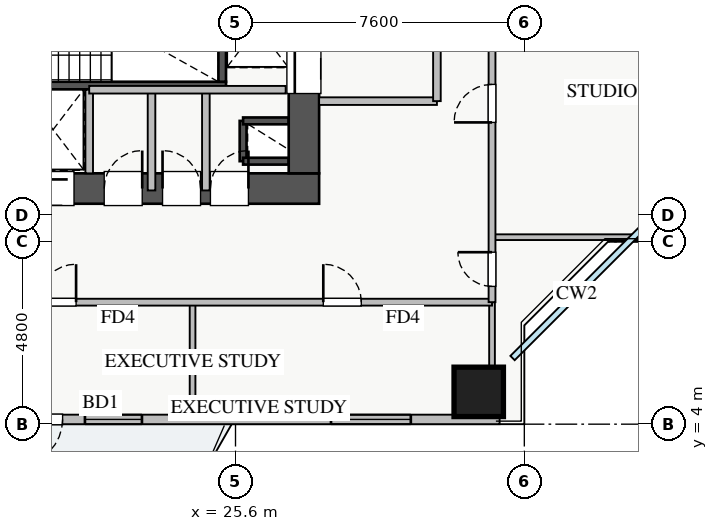
"""IFC4 building model, lengths in metres.
Left out: names, types, materials, properties, quantities, classifications, styles, units other than length and angle.
Written with IfcOpenShell. Run it as: python <this file> out.ifc"""

import sys

from ifc_helpers import new_model, si_unit, direction, frame, frame_2d, origin, origin_2d, place, context, subcontext, project, spatial, rectangle, extrude, source, transform, mapped, element, fill, save


model = new_model("IFC4")
c1 = context("Model", 3, precision=1e-05, world=origin(), true_north=direction((0.0, 1.0)))
c2 = subcontext(c1, "Body", "Model", "MODEL_VIEW")
j1 = project(units=[si_unit("LENGTHUNIT", "METRE"), si_unit("PLANEANGLEUNIT", "RADIAN")], contexts=[c1])
p1 = place(None, origin())
s1 = spatial("IfcSite", under=j1, at=p1, CompositionType="ELEMENT")
p2 = place(p1, origin())
s2 = spatial("IfcBuilding", under=s1, at=p2, CompositionType="ELEMENT")
p3 = place(p2, frame((0.0, 0.0, 86.0)))
s3 = spatial("IfcBuildingStorey", under=s2, at=p3, CompositionType="ELEMENT", Elevation=86.0)
p4 = place(p3, frame((25.8, 10.92, 0.0), z_axis=(0.0, 0.0, 1.0), x_axis=(0.0, 1.0, 0.0)))
e1 = element("IfcWall", 1, at=p4, inside=s3, PredefinedType="SHEAR", context=c2, shape_type="SweptSolid", body=[
    extrude(rectangle(XDim=1.06, YDim=0.18, at=frame_2d((0.53, 0.0))), origin(), (0.0, 0.0, 1.0), 3.07),
])
for number, where, z_axis, x_axis in (
    (2, (25.8, 11.98, 0.0), (0.0, 0.0, 1.0), (1.0, 0.0, 0.0)),
    (3, (25.8, 10.92, 0.0), (0.0, 0.0, 1.0), (1.0, 0.0, 0.0)),
):
    element("IfcWall", number, at=place(p3, frame(where, z_axis=z_axis, x_axis=x_axis)), inside=s3, PredefinedType="SHEAR", context=c2, shape_type="SweptSolid", body=[
        extrude(rectangle(XDim=1.2, YDim=0.18, at=frame_2d((0.6, 0.0))), origin(), (0.0, 0.0, 1.0), 3.07),
    ])
p5 = place(p3, frame((19.88, 12.8, 0.0), z_axis=(0.0, 0.0, 1.0), x_axis=(1.0, 0.0, 0.0)))
e4 = element("IfcWall", 4, at=p5, inside=s3, PredefinedType="SHEAR", context=c2, shape_type="SweptSolid", body=[
    extrude(rectangle(XDim=1.87, YDim=0.18, at=frame_2d((0.935, 0.0))), origin(), (0.0, 0.0, 1.0), 3.07),
])
p6 = place(p3, frame((18.2, 12.91, 0.0), z_axis=(0.0, 0.0, 1.0), x_axis=(1.0, 0.0, 0.0)))
e5 = element("IfcWall", 5, at=p6, inside=s3, PredefinedType="SHEAR", context=c2, shape_type="SweptSolid", body=[
    extrude(rectangle(XDim=7.15, YDim=0.2, at=frame_2d((3.575, 0.0))), origin(), (0.0, 0.0, 1.0), 3.25),
])
p7 = place(p6, frame((0.35, 0.0, 0.0)))
e6 = element("IfcOpeningElement", 6, at=p7, cuts=e5, PredefinedType="OPENING", context=c2, shape_type="SweptSolid", body=[
    extrude(rectangle(XDim=1.1, YDim=2.05, at=frame_2d((0.55, 1.025))), frame((0.0, 0.11, 0.0), z_axis=(0.0, -1.0, 0.0), x_axis=(1.0, 0.0, 0.0)), (0.0, 0.0, 1.0), 0.22),
])
p8 = place(p3, frame((25.25, 13.01, 0.0), z_axis=(0.0, 0.0, 1.0), x_axis=(0.0, 1.0, 0.0)))
e7 = element("IfcWall", 7, at=p8, inside=s3, PredefinedType="SHEAR", context=c2, shape_type="SweptSolid", body=[
    extrude(rectangle(XDim=2.94, YDim=0.2, at=frame_2d((1.47, 0.0))), origin(), (0.0, 0.0, 1.0), 3.25),
])
p9 = place(p3, frame((10.2, 10.2, 0.0), z_axis=(0.0, 0.0, 1.0), x_axis=(1.0, 0.0, 0.0)))
e8 = element("IfcWall", 8, at=p9, inside=s3, PredefinedType="SHEAR", context=c2, shape_type="SweptSolid", body=[
    extrude(rectangle(XDim=17.6, YDim=0.8, at=frame_2d((8.8, 0.0))), origin(), (0.0, 0.0, 1.0), 3.25),
])
p10 = place(p9, frame((1.15, 0.0, 0.0)))
e9 = element("IfcOpeningElement", 9, at=p10, cuts=e8, PredefinedType="OPENING", context=c2, shape_type="SweptSolid", body=[
    extrude(rectangle(XDim=1.1, YDim=2.05, at=frame_2d((0.55, 1.025))), frame((0.0, 0.41, 0.0), z_axis=(0.0, -1.0, 0.0), x_axis=(1.0, 0.0, 0.0)), (0.0, 0.0, 1.0), 0.82),
])
p11 = place(p9, frame((8.3, 0.0, 0.0)))
e10 = element("IfcOpeningElement", 10, at=p11, cuts=e8, PredefinedType="OPENING", context=c2, shape_type="SweptSolid", body=[
    extrude(rectangle(XDim=1.1, YDim=2.05, at=frame_2d((0.55, 1.025))), frame((0.0, 0.41, 0.0), z_axis=(0.0, -1.0, 0.0), x_axis=(1.0, 0.0, 0.0)), (0.0, 0.0, 1.0), 0.82),
])
p12 = place(p9, frame((10.05, 0.0, 0.0)))
e11 = element("IfcOpeningElement", 11, at=p12, cuts=e8, PredefinedType="OPENING", context=c2, shape_type="SweptSolid", body=[
    extrude(rectangle(XDim=1.1, YDim=2.05, at=frame_2d((0.55, 1.025))), frame((0.0, 0.41, 0.0), z_axis=(0.0, -1.0, 0.0), x_axis=(1.0, 0.0, 0.0)), (0.0, 0.0, 1.0), 0.82),
])
p13 = place(p9, frame((14.74, 0.0, 0.0)))
e12 = element("IfcOpeningElement", 12, at=p13, cuts=e8, PredefinedType="OPENING", context=c2, shape_type="SweptSolid", body=[
    extrude(rectangle(XDim=1.0, YDim=2.05, at=frame_2d((0.5, 1.025))), frame((0.0, 0.41, 0.0), z_axis=(0.0, -1.0, 0.0), x_axis=(1.0, 0.0, 0.0)), (0.0, 0.0, 1.0), 0.82),
])
p14 = place(p9, frame((11.945, 0.0, 0.0)))
e13 = element("IfcOpeningElement", 13, at=p14, cuts=e8, PredefinedType="OPENING", context=c2, shape_type="SweptSolid", body=[
    extrude(rectangle(XDim=1.0, YDim=2.05, at=frame_2d((0.5, 1.025))), frame((0.0, 0.41, 0.0), z_axis=(0.0, -1.0, 0.0), x_axis=(1.0, 0.0, 0.0)), (0.0, 0.0, 1.0), 0.82),
])
p15 = place(p9, frame((13.48, 0.0, 0.0)))
e14 = element("IfcOpeningElement", 14, at=p15, cuts=e8, PredefinedType="OPENING", context=c2, shape_type="SweptSolid", body=[
    extrude(rectangle(XDim=1.0, YDim=2.05, at=frame_2d((0.5, 1.025))), frame((0.0, 0.41, 0.0), z_axis=(0.0, -1.0, 0.0), x_axis=(1.0, 0.0, 0.0)), (0.0, 0.0, 1.0), 0.82),
])
p16 = place(p3, frame((27.4, 10.6, 0.0), z_axis=(0.0, 0.0, 1.0), x_axis=(0.0, 1.0, 0.0)))
e15 = element("IfcWall", 15, at=p16, inside=s3, PredefinedType="SHEAR", context=c2, shape_type="SweptSolid", body=[
    extrude(rectangle(XDim=5.6, YDim=0.8, at=frame_2d((2.8, 0.0))), origin(), (0.0, 0.0, 1.0), 3.25),
])
p17 = place(p16, frame((2.1, 0.0, 0.0)))
e16 = element("IfcOpeningElement", 16, at=p17, cuts=e15, PredefinedType="OPENING", context=c2, shape_type="SweptSolid", body=[
    extrude(rectangle(XDim=1.3, YDim=2.05, at=frame_2d((0.65, 1.025))), frame((0.0, 0.41, 0.0), z_axis=(0.0, -1.0, 0.0), x_axis=(1.0, 0.0, 0.0)), (0.0, 0.0, 1.0), 0.82),
])
m1 = source(origin(), c2, "Body", "SweptSolid", [
    extrude(rectangle(XDim=1.3, YDim=1.3, at=origin_2d()), origin(), (0.0, 0.0, 1.0), 3.25),
])
p18 = place(p3, frame((32.0, 4.85, 0.0), z_axis=(0.0, 0.0, 1.0), x_axis=(1.0, 0.0, 0.0)))
e17 = element("IfcColumn", 17, at=p18, inside=s3, PredefinedType="COLUMN", context=c2, shape_type="MappedRepresentation", body=[
    mapped(m1, transform((0.0, 0.0, 0.0), x_axis=(1.0, 0.0, 0.0), y_axis=(0.0, 1.0, 0.0), z_axis=(0.0, 0.0, 1.0), scale=1.0)),
])
p19 = place(p3, frame((5.45, 4.125, 0.0), z_axis=(0.0, 0.0, 1.0), x_axis=(1.0, 0.0, 0.0)))
e18 = element("IfcWall", 18, at=p19, inside=s3, PredefinedType="STANDARD", context=c2, shape_type="SweptSolid", body=[
    extrude(rectangle(XDim=27.1, YDim=0.25, at=frame_2d((13.55, 0.0))), origin(), (0.0, 0.0, 1.0), 2.61),
])
p20 = place(p19, frame((14.4, 0.0, 0.0)))
e19 = element("IfcOpeningElement", 19, at=p20, cuts=e18, PredefinedType="OPENING", context=c2, shape_type="SweptSolid", body=[
    extrude(rectangle(XDim=1.2, YDim=2.1, at=frame_2d((0.6, 1.05))), frame((0.0, 0.135, 0.0), z_axis=(0.0, -1.0, 0.0), x_axis=(1.0, 0.0, 0.0)), (0.0, 0.0, 1.0), 0.27),
])
p21 = place(p19, frame((1.45, 0.0, 0.9)))
e20 = element("IfcOpeningElement", 20, at=p21, cuts=e18, PredefinedType="OPENING", context=c2, shape_type="SweptSolid", body=[
    extrude(rectangle(XDim=1.5, YDim=1.5, at=frame_2d((0.75, 0.75))), frame((0.0, 0.135, 0.0), z_axis=(0.0, -1.0, 0.0), x_axis=(1.0, 0.0, 0.0)), (0.0, 0.0, 1.0), 0.27),
])
p22 = place(p19, frame((9.263, 0.0, 0.9)))
e21 = element("IfcOpeningElement", 21, at=p22, cuts=e18, PredefinedType="OPENING", context=c2, shape_type="SweptSolid", body=[
    extrude(rectangle(XDim=1.8, YDim=1.45, at=frame_2d((0.9, 0.725))), frame((0.0, 0.135, 0.0), z_axis=(0.0, -1.0, 0.0), x_axis=(1.0, 0.0, 0.0)), (0.0, 0.0, 1.0), 0.27),
])
p23 = place(p19, frame((16.188, 0.0, 0.9)))
e22 = element("IfcOpeningElement", 22, at=p23, cuts=e18, PredefinedType="OPENING", context=c2, shape_type="SweptSolid", body=[
    extrude(rectangle(XDim=1.5, YDim=1.45, at=frame_2d((0.75, 0.725))), frame((0.0, 0.135, 0.0), z_axis=(0.0, -1.0, 0.0), x_axis=(1.0, 0.0, 0.0)), (0.0, 0.0, 1.0), 0.27),
])
p24 = place(p19, frame((22.663, 0.0, 0.9)))
e23 = element("IfcOpeningElement", 23, at=p24, cuts=e18, PredefinedType="OPENING", context=c2, shape_type="SweptSolid", body=[
    extrude(rectangle(XDim=2.1, YDim=1.48, at=frame_2d((1.05, 0.74))), frame((0.0, 0.135, 0.0), z_axis=(0.0, -1.0, 0.0), x_axis=(1.0, 0.0, 0.0)), (0.0, 0.0, 1.0), 0.27),
])
p25 = place(p19, frame((5.084, 0.0, 0.9)))
e24 = element("IfcOpeningElement", 24, at=p25, cuts=e18, PredefinedType="OPENING", context=c2, shape_type="SweptSolid", body=[
    extrude(rectangle(XDim=2.4, YDim=1.5, at=frame_2d((1.2, 0.75))), frame((0.0, 0.135, 0.0), z_axis=(0.0, -1.0, 0.0), x_axis=(1.0, 0.0, 0.0)), (0.0, 0.0, 1.0), 0.27),
])
p26 = place(p3, frame((27.8, 12.5, 0.0), z_axis=(0.0, 0.0, 1.0), x_axis=(1.0, 0.0, 0.0)))
e25 = element("IfcWall", 25, at=p26, inside=s3, PredefinedType="PARTITIONING", context=c2, shape_type="SweptSolid", body=[
    extrude(rectangle(XDim=3.1, YDim=0.2, at=frame_2d((1.55, 0.0))), origin(), (0.0, 0.0, 1.0), 3.07),
])
p27 = place(p3, frame((30.9, 12.5, 0.0), z_axis=(0.0, 0.0, 1.0), x_axis=(0.0, 1.0, 0.0)))
e26 = element("IfcWall", 26, at=p27, inside=s3, PredefinedType="PARTITIONING", context=c2, shape_type="SweptSolid", body=[
    extrude(rectangle(XDim=3.9, YDim=0.2, at=frame_2d((1.95, 0.0))), origin(), (0.0, 0.0, 1.0), 3.07),
])
p28 = place(p27, frame((1.4, 0.0, 0.0)))
e27 = element("IfcOpeningElement", 27, at=p28, cuts=e26, PredefinedType="OPENING", context=c2, shape_type="SweptSolid", body=[
    extrude(rectangle(XDim=1.1, YDim=2.05, at=frame_2d((0.55, 1.025))), frame((0.0, 0.11, 0.0), z_axis=(0.0, -1.0, 0.0), x_axis=(1.0, 0.0, 0.0)), (0.0, 0.0, 1.0), 0.22),
])
p29 = place(p3, frame((24.82, 10.15, 0.0), z_axis=(0.0, 0.0, 1.0), x_axis=(0.0, 1.0, 0.0)))
e28 = element("IfcWall", 28, at=p29, inside=s3, PredefinedType="PARTITIONING", context=c2, shape_type="SweptSolid", body=[
    extrude(rectangle(XDim=2.65, YDim=0.2, at=frame_2d((1.325, 0.0))), origin(), (0.0, 0.0, 1.0), 3.07),
])
p30 = place(p3, frame((21.75, 10.6, 0.0), z_axis=(0.0, 0.0, 1.0), x_axis=(0.0, 1.0, 0.0)))
e29 = element("IfcWall", 29, at=p30, inside=s3, PredefinedType="PARTITIONING", context=c2, shape_type="SweptSolid", body=[
    extrude(rectangle(XDim=2.2, YDim=0.2, at=frame_2d((1.1, 0.0))), origin(), (0.0, 0.0, 1.0), 3.07),
])
p31 = place(p3, frame((23.39, 10.15, 0.0), z_axis=(0.0, 0.0, 1.0), x_axis=(0.0, 1.0, 0.0)))
e30 = element("IfcWall", 30, at=p31, inside=s3, PredefinedType="PARTITIONING", context=c2, shape_type="SweptSolid", body=[
    extrude(rectangle(XDim=2.65, YDim=0.2, at=frame_2d((1.325, 0.0))), origin(), (0.0, 0.0, 1.0), 3.07),
])
p32 = place(p3, frame((21.75, 12.8, 0.0), z_axis=(0.0, 0.0, 1.0), x_axis=(1.0, 0.0, 0.0)))
e31 = element("IfcWall", 31, at=p32, inside=s3, PredefinedType="PARTITIONING", context=c2, shape_type="SweptSolid", body=[
    extrude(rectangle(XDim=5.17, YDim=0.2, at=frame_2d((2.585, 0.0))), origin(), (0.0, 0.0, 1.0), 3.07),
])
for number, where, z_axis, x_axis in (
    (32, (24.47, 4.25, 0.0), (0.0, 0.0, 1.0), (0.0, 1.0, 0.0)),
    (33, (32.35, 4.25, 0.0), (0.0, 0.0, 1.0), (0.0, 1.0, 0.0)),
):
    element("IfcWall", number, at=place(p3, frame(where, z_axis=z_axis, x_axis=x_axis)), inside=s3, PredefinedType="PARTITIONING", context=c2, shape_type="SweptSolid", body=[
        extrude(rectangle(XDim=2.96, YDim=0.15, at=frame_2d((1.48, 0.0))), origin(), (0.0, 0.0, 1.0), 3.07),
    ])
p33 = place(p3, frame((8.72, 7.21, 0.0), z_axis=(0.0, 0.0, 1.0), x_axis=(1.0, 0.0, 0.0)))
e34 = element("IfcWall", 34, at=p33, inside=s3, PredefinedType="PARTITIONING", context=c2, shape_type="SweptSolid", body=[
    extrude(rectangle(XDim=23.63, YDim=0.18, at=frame_2d((11.815, 0.0))), origin(), (0.0, 0.0, 1.0), 3.07),
])
p34 = place(p33, frame((3.81, 0.0, 0.0)))
e35 = element("IfcOpeningElement", 35, at=p34, cuts=e34, PredefinedType="OPENING", context=c2, shape_type="SweptSolid", body=[
    extrude(rectangle(XDim=1.0, YDim=2.05, at=frame_2d((0.5, 1.025))), frame((0.0, 0.1, 0.0), z_axis=(0.0, -1.0, 0.0), x_axis=(1.0, 0.0, 0.0)), (0.0, 0.0, 1.0), 0.2),
])
p35 = place(p33, frame((11.685, 0.0, 0.0)))
e36 = element("IfcOpeningElement", 36, at=p35, cuts=e34, PredefinedType="OPENING", context=c2, shape_type="SweptSolid", body=[
    extrude(rectangle(XDim=1.0, YDim=2.05, at=frame_2d((0.5, 1.025))), frame((0.0, 0.1, 0.0), z_axis=(0.0, -1.0, 0.0), x_axis=(1.0, 0.0, 0.0)), (0.0, 0.0, 1.0), 0.2),
])
p36 = place(p33, frame((19.19, 0.0, 0.0)))
e37 = element("IfcOpeningElement", 37, at=p36, cuts=e34, PredefinedType="OPENING", context=c2, shape_type="SweptSolid", body=[
    extrude(rectangle(XDim=1.0, YDim=2.05, at=frame_2d((0.5, 1.025))), frame((0.0, 0.1, 0.0), z_axis=(0.0, -1.0, 0.0), x_axis=(1.0, 0.0, 0.0)), (0.0, 0.0, 1.0), 0.2),
])
p37 = place(p3, frame((32.35, 8.92, 0.0), z_axis=(0.0, 0.0, 1.0), x_axis=(1.0, 0.0, 0.0)))
e38 = element("IfcWall", 38, at=p37, inside=s3, PredefinedType="PARTITIONING", context=c2, shape_type="SweptSolid", body=[
    extrude(rectangle(XDim=5.4, YDim=0.15, at=frame_2d((2.7, 0.0))), origin(), (0.0, 0.0, 1.0), 3.07),
])
p38 = place(p3, frame((32.35, 7.21, 0.0), z_axis=(0.0, 0.0, 1.0), x_axis=(0.0, 1.0, 0.0)))
e39 = element("IfcWall", 39, at=p38, inside=s3, PredefinedType="PARTITIONING", context=c2, shape_type="SweptSolid", body=[
    extrude(rectangle(XDim=31.23, YDim=0.18, at=frame_2d((15.615, 0.0))), origin(), (0.0, 0.0, 1.0), 2.715),
])
p39 = place(p38, frame((30.09, 0.0, 0.0)))
e40 = element("IfcOpeningElement", 40, at=p39, cuts=e39, PredefinedType="OPENING", context=c2, shape_type="SweptSolid", body=[
    extrude(rectangle(XDim=0.9, YDim=2.05, at=frame_2d((0.45, 1.025))), frame((0.0, 0.1, 0.0), z_axis=(0.0, -1.0, 0.0), x_axis=(1.0, 0.0, 0.0)), (0.0, 0.0, 1.0), 0.2),
])
p40 = place(p38, frame((0.415, 0.0, 0.0)))
e41 = element("IfcOpeningElement", 41, at=p40, cuts=e39, PredefinedType="OPENING", context=c2, shape_type="SweptSolid", body=[
    extrude(rectangle(XDim=0.9, YDim=2.05, at=frame_2d((0.45, 1.025))), frame((0.0, 0.1, 0.0), z_axis=(0.0, -1.0, 0.0), x_axis=(1.0, 0.0, 0.0)), (0.0, 0.0, 1.0), 0.2),
])
p41 = place(p38, frame((4.73, 0.0, 0.0)))
e42 = element("IfcOpeningElement", 42, at=p41, cuts=e39, PredefinedType="OPENING", context=c2, shape_type="SweptSolid", body=[
    extrude(rectangle(XDim=1.0, YDim=2.05, at=frame_2d((0.5, 1.025))), frame((0.0, 0.1, 0.0), z_axis=(0.0, -1.0, 0.0), x_axis=(1.0, 0.0, 0.0)), (0.0, 0.0, 1.0), 0.2),
])
p42 = place(p38, frame((18.655, 0.0, 0.0)))
e43 = element("IfcOpeningElement", 43, at=p42, cuts=e39, PredefinedType="OPENING", context=c2, shape_type="SweptSolid", body=[
    extrude(rectangle(XDim=1.0, YDim=2.05, at=frame_2d((0.5, 1.025))), frame((0.0, 0.1, 0.0), z_axis=(0.0, -1.0, 0.0), x_axis=(1.0, 0.0, 0.0)), (0.0, 0.0, 1.0), 0.2),
])
m2 = source(origin(), c2, "Body", "SweptSolid", [
    extrude(rectangle(XDim=1.2, YDim=2.1, at=frame_2d((0.6, 1.05))), frame((0.0, 0.025, 0.0), z_axis=(0.0, -1.0, 0.0), x_axis=(1.0, 0.0, 0.0)), (0.0, 0.0, 1.0), 0.05),
])
p43 = place(p20, frame((1.2, 0.0, 0.0), z_axis=(0.0, 0.0, 1.0), x_axis=(-1.0, 0.0, 0.0)))
e44 = element("IfcDoor", 44, at=p43, inside=s3, OperationType="SINGLE_SWING_LEFT", PredefinedType="DOOR", context=c2, shape_type="MappedRepresentation", body=[
    mapped(m2, transform((0.0, 0.0, 0.0), x_axis=(1.0, 0.0, 0.0), y_axis=(0.0, 1.0, 0.0), z_axis=(0.0, 0.0, 1.0), scale=1.0)),
])
fill(e19, e44)
m3 = source(origin(), c2, "Body", "SweptSolid", [
    extrude(rectangle(XDim=1.5, YDim=1.45, at=frame_2d((0.75, 0.725))), frame((0.0, 0.03, 0.0), z_axis=(0.0, -1.0, 0.0), x_axis=(1.0, 0.0, 0.0)), (0.0, 0.0, 1.0), 0.06),
])
p44 = place(p23, origin())
e45 = element("IfcWindow", 45, at=p44, inside=s3, PartitioningType="DOUBLE_PANEL_VERTICAL", PredefinedType="WINDOW", context=c2, shape_type="MappedRepresentation", body=[
    mapped(m3, transform((0.0, 0.0, 0.0), x_axis=(1.0, 0.0, 0.0), y_axis=(0.0, 1.0, 0.0), z_axis=(0.0, 0.0, 1.0), scale=1.0)),
])
fill(e22, e45)
m4 = source(origin(), c2, "Body", "SweptSolid", [
    extrude(rectangle(XDim=2.1, YDim=1.48, at=frame_2d((1.05, 0.74))), frame((0.0, 0.03, 0.0), z_axis=(0.0, -1.0, 0.0), x_axis=(1.0, 0.0, 0.0)), (0.0, 0.0, 1.0), 0.06),
])
p45 = place(p24, origin())
e46 = element("IfcWindow", 46, at=p45, inside=s3, PartitioningType="TRIPLE_PANEL_VERTICAL", PredefinedType="WINDOW", context=c2, shape_type="MappedRepresentation", body=[
    mapped(m4, transform((0.0, 0.0, 0.0), x_axis=(1.0, 0.0, 0.0), y_axis=(0.0, 1.0, 0.0), z_axis=(0.0, 0.0, 1.0), scale=1.0)),
])
fill(e23, e46)
m5 = source(origin(), c2, "Body", "SweptSolid", [
    extrude(rectangle(XDim=1.3, YDim=2.05, at=frame_2d((0.65, 1.025))), frame((0.0, 0.025, 0.0), z_axis=(0.0, -1.0, 0.0), x_axis=(1.0, 0.0, 0.0)), (0.0, 0.0, 1.0), 0.05),
])
p46 = place(p17, origin())
e47 = element("IfcDoor", 47, at=p46, inside=s3, OperationType="SLIDING_TO_RIGHT", PredefinedType="DOOR", context=c2, shape_type="MappedRepresentation", body=[
    mapped(m5, transform((0.0, 0.0, 0.0), x_axis=(1.0, 0.0, 0.0), y_axis=(0.0, 1.0, 0.0), z_axis=(0.0, 0.0, 1.0), scale=1.0)),
])
fill(e16, e47)
m6 = source(origin(), c2, "Body", "SweptSolid", [
    extrude(rectangle(XDim=1.1, YDim=2.05, at=frame_2d((0.55, 1.025))), frame((0.0, 0.025, 0.0), z_axis=(0.0, -1.0, 0.0), x_axis=(1.0, 0.0, 0.0)), (0.0, 0.0, 1.0), 0.05),
])
p47 = place(p12, origin())
e48 = element("IfcDoor", 48, at=p47, inside=s3, OperationType="SLIDING_TO_RIGHT", PredefinedType="DOOR", context=c2, shape_type="MappedRepresentation", body=[
    mapped(m6, transform((0.0, 0.0, 0.0), x_axis=(1.0, 0.0, 0.0), y_axis=(0.0, 1.0, 0.0), z_axis=(0.0, 0.0, 1.0), scale=1.0)),
])
fill(e11, e48)
m7 = source(origin(), c2, "Body", "SweptSolid", [
    extrude(rectangle(XDim=1.0, YDim=2.05, at=frame_2d((0.5, 1.025))), frame((0.0, 0.025, 0.0), z_axis=(0.0, -1.0, 0.0), x_axis=(1.0, 0.0, 0.0)), (0.0, 0.0, 1.0), 0.05),
])
p48 = place(p13, origin())
e49 = element("IfcDoor", 49, at=p48, inside=s3, OperationType="SINGLE_SWING_RIGHT", PredefinedType="DOOR", context=c2, shape_type="MappedRepresentation", body=[
    mapped(m7, transform((0.0, 0.0, 0.0), x_axis=(1.0, 0.0, 0.0), y_axis=(0.0, 1.0, 0.0), z_axis=(0.0, 0.0, 1.0), scale=1.0)),
])
fill(e12, e49)
p49 = place(p14, origin())
e50 = element("IfcDoor", 50, at=p49, inside=s3, OperationType="SINGLE_SWING_RIGHT", PredefinedType="DOOR", context=c2, shape_type="MappedRepresentation", body=[
    mapped(m7, transform((0.0, 0.0, 0.0), x_axis=(1.0, 0.0, 0.0), y_axis=(0.0, 1.0, 0.0), z_axis=(0.0, 0.0, 1.0), scale=1.0)),
])
fill(e13, e50)
p50 = place(p15, origin())
e51 = element("IfcDoor", 51, at=p50, inside=s3, OperationType="SINGLE_SWING_LEFT", PredefinedType="DOOR", context=c2, shape_type="MappedRepresentation", body=[
    mapped(m7, transform((0.0, 0.0, 0.0), x_axis=(1.0, 0.0, 0.0), y_axis=(0.0, 1.0, 0.0), z_axis=(0.0, 0.0, 1.0), scale=1.0)),
])
fill(e14, e51)
p51 = place(p35, origin())
e52 = element("IfcDoor", 52, at=p51, inside=s3, OperationType="SINGLE_SWING_RIGHT", PredefinedType="DOOR", context=c2, shape_type="MappedRepresentation", body=[
    mapped(m7, transform((0.0, 0.0, 0.0), x_axis=(1.0, 0.0, 0.0), y_axis=(0.0, 1.0, 0.0), z_axis=(0.0, 0.0, 1.0), scale=1.0)),
])
fill(e36, e52)
p52 = place(p36, origin())
e53 = element("IfcDoor", 53, at=p52, inside=s3, OperationType="SINGLE_SWING_LEFT", PredefinedType="DOOR", context=c2, shape_type="MappedRepresentation", body=[
    mapped(m7, transform((0.0, 0.0, 0.0), x_axis=(1.0, 0.0, 0.0), y_axis=(0.0, 1.0, 0.0), z_axis=(0.0, 0.0, 1.0), scale=1.0)),
])
fill(e37, e53)
m8 = source(origin(), c2, "Body", "SweptSolid", [
    extrude(rectangle(XDim=0.9, YDim=2.05, at=frame_2d((0.45, 1.025))), frame((0.0, 0.025, 0.0), z_axis=(0.0, -1.0, 0.0), x_axis=(1.0, 0.0, 0.0)), (0.0, 0.0, 1.0), 0.05),
])
p53 = place(p40, origin())
e54 = element("IfcDoor", 54, at=p53, inside=s3, OperationType="SINGLE_SWING_RIGHT", PredefinedType="DOOR", context=c2, shape_type="MappedRepresentation", body=[
    mapped(m8, transform((0.0, 0.0, 0.0), x_axis=(1.0, 0.0, 0.0), y_axis=(0.0, 1.0, 0.0), z_axis=(0.0, 0.0, 1.0), scale=1.0)),
])
fill(e41, e54)
p54 = place(p41, origin())
e55 = element("IfcDoor", 55, at=p54, inside=s3, OperationType="SINGLE_SWING_LEFT", PredefinedType="DOOR", context=c2, shape_type="MappedRepresentation", body=[
    mapped(m7, transform((0.0, 0.0, 0.0), x_axis=(1.0, 0.0, 0.0), y_axis=(0.0, 1.0, 0.0), z_axis=(0.0, 0.0, 1.0), scale=1.0)),
])
fill(e42, e55)
save(model, sys.argv[1])
